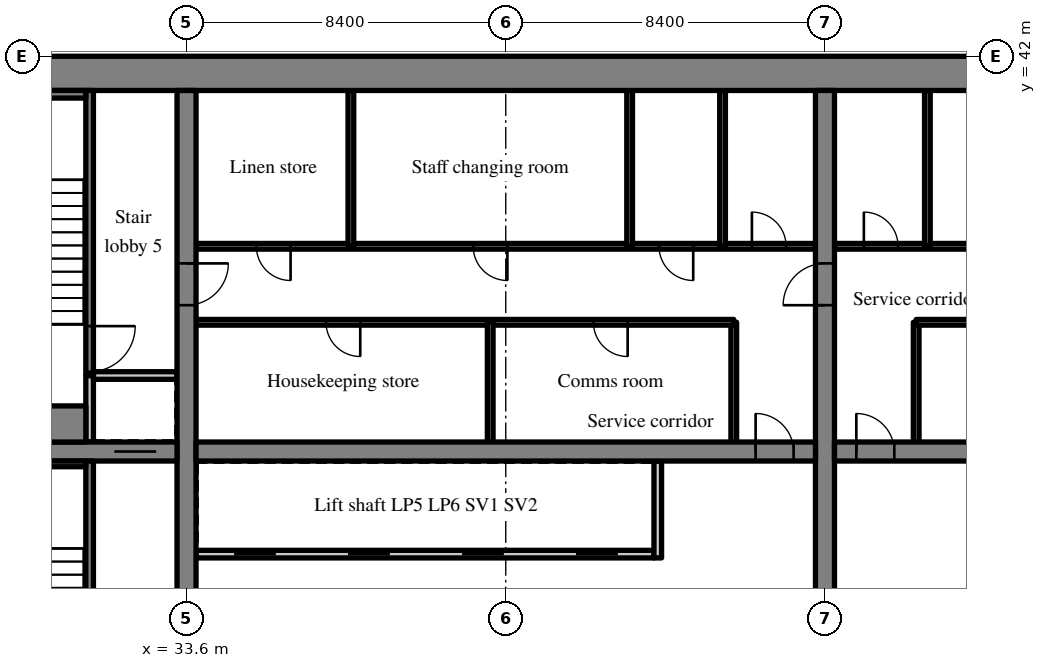
"""IFC4 building model, lengths in metres.
Left out: names, types, materials, properties, quantities, classifications, styles, units other than length and angle.
Written with IfcOpenShell. Run it as: python <this file> out.ifc"""

import sys

from ifc_helpers import new_model, si_unit, direction, frame, frame_2d, origin, place, context, subcontext, project, spatial, rectangle, extrude, source, transform, mapped, element, fill, save


model = new_model("IFC4")
c1 = context("Model", 3, precision=1e-05, world=origin(), true_north=direction((0.0, 1.0)))
c2 = subcontext(c1, "Body", "Model", "MODEL_VIEW")
j1 = project(units=[si_unit("LENGTHUNIT", "METRE"), si_unit("PLANEANGLEUNIT", "RADIAN")], contexts=[c1])
p1 = place(None, origin())
s1 = spatial("IfcSite", under=j1, at=p1, CompositionType="ELEMENT")
p2 = place(p1, origin())
s2 = spatial("IfcBuilding", under=s1, at=p2, CompositionType="ELEMENT")
p3 = place(p2, frame((0.0, 0.0, 106.6)))
s3 = spatial("IfcBuildingStorey", under=s2, at=p3, CompositionType="ELEMENT", Elevation=106.6)
m1 = source(origin(), c2, "Body", "SweptSolid", [
    extrude(rectangle(XDim=50.4, YDim=0.9, at=frame_2d((25.2, 0.0))), origin(), (0.0, 0.0, 1.0), 3.52),
])
p4 = place(p3, frame((25.2, 41.55, 0.0), z_axis=(0.0, 0.0, 1.0), x_axis=(1.0, 0.0, 0.0)))
e1 = element("IfcWall", 1, at=p4, inside=s3, PredefinedType="SHEAR", context=c2, shape_type="MappedRepresentation", body=[
    mapped(m1, transform((0.0, 0.0, 0.0), scale=1.0)),
])
m2 = source(origin(), c2, "Body", "SweptSolid", [
    extrude(rectangle(XDim=18.2, YDim=0.5, at=frame_2d((9.1, 0.0))), origin(), (0.0, 0.0, 1.0), 3.52),
])
p5 = place(p3, frame((33.6, 22.9, 0.0), z_axis=(0.0, 0.0, 1.0), x_axis=(0.0, 1.0, 0.0)))
e2 = element("IfcWall", 2, at=p5, inside=s3, PredefinedType="SHEAR", context=c2, shape_type="MappedRepresentation", body=[
    mapped(m2, transform((0.0, 0.0, 0.0), scale=1.0)),
])
m3 = source(origin(), c2, "Body", "SweptSolid", [
    extrude(rectangle(XDim=1.1, YDim=2.1, at=frame_2d((0.55, 1.05))), frame((0.0, 0.26, 0.0), z_axis=(0.0, -1.0, 0.0), x_axis=(1.0, 0.0, 0.0)), (0.0, 0.0, 1.0), 0.52),
])
p6 = place(p5, frame((12.55, 0.0, 0.0)))
e3 = element("IfcOpeningElement", 3, at=p6, cuts=e2, PredefinedType="OPENING", context=c2, shape_type="MappedRepresentation", body=[
    mapped(m3, transform((0.0, 0.0, 0.0), scale=1.0)),
])
p7 = place(p3, frame((50.4, 22.9, 0.0), z_axis=(0.0, 0.0, 1.0), x_axis=(0.0, 1.0, 0.0)))
e4 = element("IfcWall", 4, at=p7, inside=s3, PredefinedType="SHEAR", context=c2, shape_type="MappedRepresentation", body=[
    mapped(m2, transform((0.0, 0.0, 0.0), scale=1.0)),
])
p8 = place(p7, frame((12.55, 0.0, 0.0)))
e5 = element("IfcOpeningElement", 5, at=p8, cuts=e4, PredefinedType="OPENING", context=c2, shape_type="MappedRepresentation", body=[
    mapped(m3, transform((0.0, 0.0, 0.0), scale=1.0)),
])
m4 = source(origin(), c2, "Body", "SweptSolid", [
    extrude(rectangle(XDim=7.25, YDim=0.5, at=frame_2d((3.625, 0.0))), origin(), (0.0, 0.0, 1.0), 3.52),
])
p9 = place(p3, frame((26.1, 31.6, 0.0), z_axis=(0.0, 0.0, 1.0), x_axis=(1.0, 0.0, 0.0)))
e6 = element("IfcWall", 6, at=p9, inside=s3, PredefinedType="SHEAR", context=c2, shape_type="MappedRepresentation", body=[
    mapped(m4, transform((0.0, 0.0, 0.0), scale=1.0)),
])
p10 = place(p9, frame((5.6, 0.0, 0.0)))
e7 = element("IfcOpeningElement", 7, at=p10, cuts=e6, PredefinedType="OPENING", context=c2, shape_type="MappedRepresentation", body=[
    mapped(m3, transform((0.0, 0.0, 0.0), scale=1.0)),
])
m5 = source(origin(), c2, "Body", "SweptSolid", [
    extrude(rectangle(XDim=16.3, YDim=0.5, at=frame_2d((8.15, 0.0))), origin(), (0.0, 0.0, 1.0), 3.52),
])
p11 = place(p3, frame((33.85, 31.6, 0.0), z_axis=(0.0, 0.0, 1.0), x_axis=(1.0, 0.0, 0.0)))
e8 = element("IfcWall", 8, at=p11, inside=s3, PredefinedType="SHEAR", context=c2, shape_type="MappedRepresentation", body=[
    mapped(m5, transform((0.0, 0.0, 0.0), scale=1.0)),
])
m6 = source(origin(), c2, "Body", "SweptSolid", [
    extrude(rectangle(XDim=1.0, YDim=2.1, at=frame_2d((0.5, 1.05))), frame((0.0, 0.26, 0.0), z_axis=(0.0, -1.0, 0.0), x_axis=(1.0, 0.0, 0.0)), (0.0, 0.0, 1.0), 0.52),
])
p12 = place(p11, frame((14.725, 0.0, 0.0)))
e9 = element("IfcOpeningElement", 9, at=p12, cuts=e8, PredefinedType="OPENING", context=c2, shape_type="MappedRepresentation", body=[
    mapped(m6, transform((0.0, 0.0, 0.0), scale=1.0)),
])
m7 = source(origin(), c2, "Body", "SweptSolid", [
    extrude(rectangle(XDim=16.3, YDim=0.5, at=frame_2d((8.15, 0.0))), origin(), (0.0, 0.0, 1.0), 3.52),
])
p13 = place(p3, frame((50.65, 31.6, 0.0), z_axis=(0.0, 0.0, 1.0), x_axis=(1.0, 0.0, 0.0)))
e10 = element("IfcWall", 10, at=p13, inside=s3, PredefinedType="SHEAR", context=c2, shape_type="MappedRepresentation", body=[
    mapped(m7, transform((0.0, 0.0, 0.0), scale=1.0)),
])
p14 = place(p13, frame((0.575, 0.0, 0.0)))
e11 = element("IfcOpeningElement", 11, at=p14, cuts=e10, PredefinedType="OPENING", context=c2, shape_type="MappedRepresentation", body=[
    mapped(m6, transform((0.0, 0.0, 0.0), scale=1.0)),
])
m8 = source(origin(), c2, "Body", "SweptSolid", [
    extrude(rectangle(XDim=12.05, YDim=0.2, at=frame_2d((6.025, 0.0))), origin(), (0.0, 0.0, 1.0), 3.52),
])
p15 = place(p3, frame((33.85, 28.9, 0.0), z_axis=(0.0, 0.0, 1.0), x_axis=(1.0, 0.0, 0.0)))
e12 = element("IfcWall", 12, at=p15, inside=s3, PredefinedType="SOLIDWALL", context=c2, shape_type="MappedRepresentation", body=[
    mapped(m8, transform((0.0, 0.0, 0.0), scale=1.0)),
])
m9 = source(origin(), c2, "Body", "SweptSolid", [
    extrude(rectangle(XDim=1.1, YDim=2.1, at=frame_2d((0.55, 1.05))), frame((0.0, 0.11, 0.0), z_axis=(0.0, -1.0, 0.0), x_axis=(1.0, 0.0, 0.0)), (0.0, 0.0, 1.0), 0.22),
])
p16 = place(p15, frame((1.0, 0.0, 0.0)))
e13 = element("IfcOpeningElement", 13, at=p16, cuts=e12, PredefinedType="OPENING", context=c2, shape_type="MappedRepresentation", body=[
    mapped(m9, transform((0.0, 0.0, 0.0), scale=1.0)),
])
p17 = place(p15, frame((4.0, 0.0, 0.0)))
e14 = element("IfcOpeningElement", 14, at=p17, cuts=e12, PredefinedType="OPENING", context=c2, shape_type="MappedRepresentation", body=[
    mapped(m9, transform((0.0, 0.0, 0.0), scale=1.0)),
])
p18 = place(p15, frame((7.0, 0.0, 0.0)))
e15 = element("IfcOpeningElement", 15, at=p18, cuts=e12, PredefinedType="OPENING", context=c2, shape_type="MappedRepresentation", body=[
    mapped(m9, transform((0.0, 0.0, 0.0), scale=1.0)),
])
p19 = place(p15, frame((10.0, 0.0, 0.0)))
e16 = element("IfcOpeningElement", 16, at=p19, cuts=e12, PredefinedType="OPENING", context=c2, shape_type="MappedRepresentation", body=[
    mapped(m9, transform((0.0, 0.0, 0.0), scale=1.0)),
])
m10 = source(origin(), c2, "Body", "SweptSolid", [
    extrude(rectangle(XDim=2.55, YDim=0.2, at=frame_2d((1.275, 0.0))), origin(), (0.0, 0.0, 1.0), 3.52),
])
p20 = place(p3, frame((46.0, 28.8, 0.0), z_axis=(0.0, 0.0, 1.0), x_axis=(0.0, 1.0, 0.0)))
e17 = element("IfcWall", 17, at=p20, inside=s3, PredefinedType="SOLIDWALL", context=c2, shape_type="MappedRepresentation", body=[
    mapped(m10, transform((0.0, 0.0, 0.0), scale=1.0)),
])
m11 = source(origin(), c2, "Body", "SweptSolid", [
    extrude(rectangle(XDim=3.15, YDim=0.15, at=frame_2d((1.575, 0.0))), origin(), (0.0, 0.0, 1.0), 3.52),
])
p21 = place(p3, frame((48.0, 31.85, 0.0), z_axis=(0.0, 0.0, 1.0), x_axis=(0.0, 1.0, 0.0)))
e18 = element("IfcWall", 18, at=p21, inside=s3, PredefinedType="PARTITIONING", context=c2, shape_type="MappedRepresentation", body=[
    mapped(m11, transform((0.0, 0.0, 0.0), scale=1.0)),
])
m12 = source(origin(), c2, "Body", "SweptSolid", [
    extrude(rectangle(XDim=14.15, YDim=0.15, at=frame_2d((7.075, 0.0))), origin(), (0.0, 0.0, 1.0), 3.52),
])
p22 = place(p3, frame((33.85, 35.0, 0.0), z_axis=(0.0, 0.0, 1.0), x_axis=(1.0, 0.0, 0.0)))
e19 = element("IfcWall", 19, at=p22, inside=s3, PredefinedType="PARTITIONING", context=c2, shape_type="MappedRepresentation", body=[
    mapped(m12, transform((0.0, 0.0, 0.0), scale=1.0)),
])
m13 = source(origin(), c2, "Body", "SweptSolid", [
    extrude(rectangle(XDim=0.9, YDim=2.1, at=frame_2d((0.45, 1.05))), frame((0.0, 0.085, 0.0), z_axis=(0.0, -1.0, 0.0), x_axis=(1.0, 0.0, 0.0)), (0.0, 0.0, 1.0), 0.17),
])
p23 = place(p22, frame((3.421, 0.0, 0.0)))
e20 = element("IfcOpeningElement", 20, at=p23, cuts=e19, PredefinedType="OPENING", context=c2, shape_type="MappedRepresentation", body=[
    mapped(m13, transform((0.0, 0.0, 0.0), scale=1.0)),
])
p24 = place(p22, frame((10.458, 0.0, 0.0)))
e21 = element("IfcOpeningElement", 21, at=p24, cuts=e19, PredefinedType="OPENING", context=c2, shape_type="MappedRepresentation", body=[
    mapped(m13, transform((0.0, 0.0, 0.0), scale=1.0)),
])
m14 = source(origin(), c2, "Body", "SweptSolid", [
    extrude(rectangle(XDim=16.3, YDim=0.15, at=frame_2d((8.15, 0.0))), origin(), (0.0, 0.0, 1.0), 3.52),
])
p25 = place(p3, frame((33.85, 37.0, 0.0), z_axis=(0.0, 0.0, 1.0), x_axis=(1.0, 0.0, 0.0)))
e22 = element("IfcWall", 22, at=p25, inside=s3, PredefinedType="PARTITIONING", context=c2, shape_type="MappedRepresentation", body=[
    mapped(m14, transform((0.0, 0.0, 0.0), scale=1.0)),
])
p26 = place(p25, frame((1.588, 0.0, 0.0)))
e23 = element("IfcOpeningElement", 23, at=p26, cuts=e22, PredefinedType="OPENING", context=c2, shape_type="MappedRepresentation", body=[
    mapped(m13, transform((0.0, 0.0, 0.0), scale=1.0)),
])
p27 = place(p25, frame((7.293, 0.0, 0.0)))
e24 = element("IfcOpeningElement", 24, at=p27, cuts=e22, PredefinedType="OPENING", context=c2, shape_type="MappedRepresentation", body=[
    mapped(m13, transform((0.0, 0.0, 0.0), scale=1.0)),
])
p28 = place(p25, frame((12.183, 0.0, 0.0)))
e25 = element("IfcOpeningElement", 25, at=p28, cuts=e22, PredefinedType="OPENING", context=c2, shape_type="MappedRepresentation", body=[
    mapped(m13, transform((0.0, 0.0, 0.0), scale=1.0)),
])
p29 = place(p25, frame((14.627, 0.0, 0.0)))
e26 = element("IfcOpeningElement", 26, at=p29, cuts=e22, PredefinedType="OPENING", context=c2, shape_type="MappedRepresentation", body=[
    mapped(m13, transform((0.0, 0.0, 0.0), scale=1.0)),
])
p30 = place(p3, frame((41.591, 31.85, 0.0), z_axis=(0.0, 0.0, 1.0), x_axis=(0.0, 1.0, 0.0)))
e27 = element("IfcWall", 27, at=p30, inside=s3, PredefinedType="PARTITIONING", context=c2, shape_type="MappedRepresentation", body=[
    mapped(m11, transform((0.0, 0.0, 0.0), scale=1.0)),
])
m15 = source(origin(), c2, "Body", "SweptSolid", [
    extrude(rectangle(XDim=4.1, YDim=0.15, at=frame_2d((2.05, 0.0))), origin(), (0.0, 0.0, 1.0), 3.52),
])
for number, where, z_axis, x_axis in (
    (28, (37.925, 37.0, 0.0), (0.0, 0.0, 1.0), (0.0, 1.0, 0.0)),
    (29, (45.26, 37.0, 0.0), (0.0, 0.0, 1.0), (0.0, 1.0, 0.0)),
    (30, (47.705, 37.0, 0.0), (0.0, 0.0, 1.0), (0.0, 1.0, 0.0)),
):
    element("IfcWall", number, at=place(p3, frame(where, z_axis=z_axis, x_axis=x_axis)), inside=s3, PredefinedType="PARTITIONING", context=c2, shape_type="MappedRepresentation", body=[
        mapped(m15, transform((0.0, 0.0, 0.0), scale=1.0)),
    ])
p31 = place(p3, frame((52.8, 31.85, 0.0), z_axis=(0.0, 0.0, 1.0), x_axis=(0.0, 1.0, 0.0)))
e31 = element("IfcWall", 31, at=p31, inside=s3, PredefinedType="PARTITIONING", context=c2, shape_type="MappedRepresentation", body=[
    mapped(m11, transform((0.0, 0.0, 0.0), scale=1.0)),
])
p32 = place(p3, frame((66.95, 35.0, 0.0), z_axis=(0.0, 0.0, 1.0), x_axis=(-1.0, 0.0, 0.0)))
e32 = element("IfcWall", 32, at=p32, inside=s3, PredefinedType="PARTITIONING", context=c2, shape_type="MappedRepresentation", body=[
    mapped(m12, transform((0.0, 0.0, 0.0), scale=1.0)),
])
p33 = place(p32, frame((6.588, 0.0, 0.0)))
e33 = element("IfcOpeningElement", 33, at=p33, cuts=e32, PredefinedType="OPENING", context=c2, shape_type="MappedRepresentation", body=[
    mapped(m13, transform((0.0, 0.0, 0.0), scale=1.0)),
])
m16 = source(origin(), c2, "Body", "SweptSolid", [
    extrude(rectangle(XDim=16.3, YDim=0.15, at=frame_2d((8.15, 0.0))), origin(), (0.0, 0.0, 1.0), 3.52),
])
p34 = place(p3, frame((66.95, 37.0, 0.0), z_axis=(0.0, 0.0, 1.0), x_axis=(-1.0, 0.0, 0.0)))
e34 = element("IfcWall", 34, at=p34, inside=s3, PredefinedType="PARTITIONING", context=c2, shape_type="MappedRepresentation", body=[
    mapped(m16, transform((0.0, 0.0, 0.0), scale=1.0)),
])
p35 = place(p34, frame((3.218, 0.0, 0.0)))
e35 = element("IfcOpeningElement", 35, at=p35, cuts=e34, PredefinedType="OPENING", context=c2, shape_type="MappedRepresentation", body=[
    mapped(m13, transform((0.0, 0.0, 0.0), scale=1.0)),
])
p36 = place(p34, frame((8.108, 0.0, 0.0)))
e36 = element("IfcOpeningElement", 36, at=p36, cuts=e34, PredefinedType="OPENING", context=c2, shape_type="MappedRepresentation", body=[
    mapped(m13, transform((0.0, 0.0, 0.0), scale=1.0)),
])
p37 = place(p34, frame((11.368, 0.0, 0.0)))
e37 = element("IfcOpeningElement", 37, at=p37, cuts=e34, PredefinedType="OPENING", context=c2, shape_type="MappedRepresentation", body=[
    mapped(m13, transform((0.0, 0.0, 0.0), scale=1.0)),
])
p38 = place(p34, frame((14.627, 0.0, 0.0)))
e38 = element("IfcOpeningElement", 38, at=p38, cuts=e34, PredefinedType="OPENING", context=c2, shape_type="MappedRepresentation", body=[
    mapped(m13, transform((0.0, 0.0, 0.0), scale=1.0)),
])
p39 = place(p3, frame((53.095, 37.0, 0.0), z_axis=(0.0, 0.0, 1.0), x_axis=(0.0, 1.0, 0.0)))
e39 = element("IfcWall", 39, at=p39, inside=s3, PredefinedType="PARTITIONING", context=c2, shape_type="MappedRepresentation", body=[
    mapped(m15, transform((0.0, 0.0, 0.0), scale=1.0)),
])
m17 = source(origin(), c2, "Body", "SweptSolid", [
    extrude(rectangle(XDim=8.45, YDim=0.2, at=frame_2d((4.225, 0.0))), origin(), (0.0, 0.0, 1.0), 3.52),
])
p40 = place(p3, frame((31.05, 22.9, 0.0), z_axis=(0.0, 0.0, 1.0), x_axis=(0.0, 1.0, 0.0)))
e40 = element("IfcWall", 40, at=p40, inside=s3, PredefinedType="SOLIDWALL", context=c2, shape_type="MappedRepresentation", body=[
    mapped(m17, transform((0.0, 0.0, 0.0), scale=1.0)),
])
m18 = source(origin(), c2, "Body", "SweptSolid", [
    extrude(rectangle(XDim=1.2, YDim=2.1, at=frame_2d((0.6, 1.05))), frame((0.0, 0.11, 0.0), z_axis=(0.0, -1.0, 0.0), x_axis=(1.0, 0.0, 0.0)), (0.0, 0.0, 1.0), 0.22),
])
p41 = place(p40, frame((0.7, 0.0, 0.0)))
e41 = element("IfcOpeningElement", 41, at=p41, cuts=e40, PredefinedType="OPENING", context=c2, shape_type="MappedRepresentation", body=[
    mapped(m18, transform((0.0, 0.0, 0.0), scale=1.0)),
])
m19 = source(origin(), c2, "Body", "SweptSolid", [
    extrude(rectangle(XDim=1.75, YDim=0.2, at=frame_2d((0.875, 0.0))), origin(), (0.0, 0.0, 1.0), 3.52),
])
p42 = place(p3, frame((31.05, 31.85, 0.0), z_axis=(0.0, 0.0, 1.0), x_axis=(0.0, 1.0, 0.0)))
e42 = element("IfcWall", 42, at=p42, inside=s3, PredefinedType="SOLIDWALL", context=c2, shape_type="MappedRepresentation", body=[
    mapped(m19, transform((0.0, 0.0, 0.0), scale=1.0)),
])
m20 = source(origin(), c2, "Body", "SweptSolid", [
    extrude(rectangle(XDim=2.2, YDim=0.2, at=frame_2d((1.1, 0.0))), origin(), (0.0, 0.0, 1.0), 3.52),
])
p43 = place(p3, frame((31.15, 33.6, 0.0), z_axis=(0.0, 0.0, 1.0), x_axis=(1.0, 0.0, 0.0)))
e43 = element("IfcWall", 43, at=p43, inside=s3, PredefinedType="SOLIDWALL", context=c2, shape_type="MappedRepresentation", body=[
    mapped(m20, transform((0.0, 0.0, 0.0), scale=1.0)),
])
m21 = source(origin(), c2, "Body", "SweptSolid", [
    extrude(rectangle(XDim=7.5, YDim=0.2, at=frame_2d((3.75, 0.0))), origin(), (0.0, 0.0, 1.0), 3.52),
])
p44 = place(p3, frame((31.05, 33.6, 0.0), z_axis=(0.0, 0.0, 1.0), x_axis=(0.0, 1.0, 0.0)))
e44 = element("IfcWall", 44, at=p44, inside=s3, PredefinedType="SOLIDWALL", context=c2, shape_type="MappedRepresentation", body=[
    mapped(m21, transform((0.0, 0.0, 0.0), scale=1.0)),
])
p45 = place(p44, frame((0.1, 0.0, 0.0)))
e45 = element("IfcOpeningElement", 45, at=p45, cuts=e44, PredefinedType="OPENING", context=c2, shape_type="MappedRepresentation", body=[
    mapped(m18, transform((0.0, 0.0, 0.0), scale=1.0)),
])
m22 = source(origin(), c2, "Body", "SweptSolid", [
    extrude(rectangle(XDim=4.85, YDim=0.15, at=frame_2d((2.425, 0.0))), origin(), (0.0, 0.0, 1.0), 3.52),
])
p46 = place(p3, frame((26.1, 31.275, 0.0), z_axis=(0.0, 0.0, 1.0), x_axis=(1.0, 0.0, 0.0)))
e46 = element("IfcWall", 46, at=p46, inside=s3, PredefinedType="SOLIDWALL", context=c2, shape_type="MappedRepresentation", body=[
    mapped(m22, transform((0.0, 0.0, 0.0), scale=1.0)),
])
m23 = source(origin(), c2, "Body", "SweptSolid", [
    extrude(rectangle(XDim=4.85, YDim=0.2, at=frame_2d((2.425, 0.0))), origin(), (0.0, 0.0, 1.0), 3.52),
])
p47 = place(p3, frame((26.1, 41.0, 0.0), z_axis=(0.0, 0.0, 1.0), x_axis=(1.0, 0.0, 0.0)))
e47 = element("IfcWall", 47, at=p47, inside=s3, PredefinedType="SOLIDWALL", context=c2, shape_type="MappedRepresentation", body=[
    mapped(m23, transform((0.0, 0.0, 0.0), scale=1.0)),
])
m24 = source(origin(), c2, "Body", "SweptSolid", [
    extrude(rectangle(XDim=4.85, YDim=0.95, at=frame_2d((2.425, 0.0))), origin(), (0.0, 0.0, 1.0), 3.52),
])
p48 = place(p3, frame((26.1, 32.325, 0.0), z_axis=(0.0, 0.0, 1.0), x_axis=(1.0, 0.0, 0.0)))
e48 = element("IfcWall", 48, at=p48, inside=s3, PredefinedType="SOLIDWALL", context=c2, shape_type="MappedRepresentation", body=[
    mapped(m24, transform((0.0, 0.0, 0.0), scale=1.0)),
])
m25 = source(origin(), c2, "Body", "SweptSolid", [
    extrude(rectangle(XDim=1.0, YDim=2.1, at=frame_2d((0.5, 1.05))), frame((0.0, 0.025, 0.0), z_axis=(0.0, -1.0, 0.0), x_axis=(1.0, 0.0, 0.0)), (0.0, 0.0, 1.0), 0.05),
])
p49 = place(p12, origin())
e49 = element("IfcDoor", 49, at=p49, inside=s3, OperationType="SINGLE_SWING_LEFT", PredefinedType="DOOR", context=c2, shape_type="MappedRepresentation", body=[
    mapped(m25, transform((0.0, 0.0, 0.0), scale=1.0)),
])
fill(e9, e49)
m26 = source(origin(), c2, "Body", "SweptSolid", [
    extrude(rectangle(XDim=1.1, YDim=2.1, at=frame_2d((0.55, 1.05))), frame((0.0, 0.025, 0.0), z_axis=(0.0, -1.0, 0.0), x_axis=(1.0, 0.0, 0.0)), (0.0, 0.0, 1.0), 0.05),
])
p50 = place(p16, origin())
e50 = element("IfcDoor", 50, at=p50, inside=s3, OperationType="SLIDING_TO_LEFT", PredefinedType="DOOR", context=c2, shape_type="MappedRepresentation", body=[
    mapped(m26, transform((0.0, 0.0, 0.0), scale=1.0)),
])
fill(e13, e50)
p51 = place(p17, origin())
e51 = element("IfcDoor", 51, at=p51, inside=s3, OperationType="SLIDING_TO_RIGHT", PredefinedType="DOOR", context=c2, shape_type="MappedRepresentation", body=[
    mapped(m26, transform((0.0, 0.0, 0.0), scale=1.0)),
])
fill(e14, e51)
p52 = place(p18, origin())
e52 = element("IfcDoor", 52, at=p52, inside=s3, OperationType="SLIDING_TO_LEFT", PredefinedType="DOOR", context=c2, shape_type="MappedRepresentation", body=[
    mapped(m26, transform((0.0, 0.0, 0.0), scale=1.0)),
])
fill(e15, e52)
p53 = place(p19, origin())
e53 = element("IfcDoor", 53, at=p53, inside=s3, OperationType="SLIDING_TO_RIGHT", PredefinedType="DOOR", context=c2, shape_type="MappedRepresentation", body=[
    mapped(m26, transform((0.0, 0.0, 0.0), scale=1.0)),
])
fill(e16, e53)
m27 = source(origin(), c2, "Body", "SweptSolid", [
    extrude(rectangle(XDim=0.9, YDim=2.1, at=frame_2d((0.45, 1.05))), frame((0.0, 0.025, 0.0), z_axis=(0.0, -1.0, 0.0), x_axis=(1.0, 0.0, 0.0)), (0.0, 0.0, 1.0), 0.05),
])
p54 = place(p23, origin())
e54 = element("IfcDoor", 54, at=p54, inside=s3, OperationType="SINGLE_SWING_RIGHT", PredefinedType="DOOR", context=c2, shape_type="MappedRepresentation", body=[
    mapped(m27, transform((0.0, 0.0, 0.0), scale=1.0)),
])
fill(e20, e54)
p55 = place(p24, origin())
e55 = element("IfcDoor", 55, at=p55, inside=s3, OperationType="SINGLE_SWING_RIGHT", PredefinedType="DOOR", context=c2, shape_type="MappedRepresentation", body=[
    mapped(m27, transform((0.0, 0.0, 0.0), scale=1.0)),
])
fill(e21, e55)
p56 = place(p26, origin())
e56 = element("IfcDoor", 56, at=p56, inside=s3, OperationType="SINGLE_SWING_RIGHT", PredefinedType="DOOR", context=c2, shape_type="MappedRepresentation", body=[
    mapped(m27, transform((0.0, 0.0, 0.0), scale=1.0)),
])
fill(e23, e56)
p57 = place(p27, origin())
e57 = element("IfcDoor", 57, at=p57, inside=s3, OperationType="SINGLE_SWING_RIGHT", PredefinedType="DOOR", context=c2, shape_type="MappedRepresentation", body=[
    mapped(m27, transform((0.0, 0.0, 0.0), scale=1.0)),
])
fill(e24, e57)
p58 = place(p28, origin())
e58 = element("IfcDoor", 58, at=p58, inside=s3, OperationType="SINGLE_SWING_RIGHT", PredefinedType="DOOR", context=c2, shape_type="MappedRepresentation", body=[
    mapped(m27, transform((0.0, 0.0, 0.0), scale=1.0)),
])
fill(e25, e58)
p59 = place(p29, origin())
e59 = element("IfcDoor", 59, at=p59, inside=s3, OperationType="SINGLE_SWING_LEFT", PredefinedType="DOOR", context=c2, shape_type="MappedRepresentation", body=[
    mapped(m27, transform((0.0, 0.0, 0.0), scale=1.0)),
])
fill(e26, e59)
p60 = place(p14, origin())
e60 = element("IfcDoor", 60, at=p60, inside=s3, OperationType="SINGLE_SWING_LEFT", PredefinedType="DOOR", context=c2, shape_type="MappedRepresentation", body=[
    mapped(m25, transform((0.0, 0.0, 0.0), scale=1.0)),
])
fill(e11, e60)
p61 = place(p38, origin())
e61 = element("IfcDoor", 61, at=p61, inside=s3, OperationType="SINGLE_SWING_RIGHT", PredefinedType="DOOR", context=c2, shape_type="MappedRepresentation", body=[
    mapped(m27, transform((0.0, 0.0, 0.0), scale=1.0)),
])
fill(e38, e61)
p62 = place(p10, origin())
e62 = element("IfcDoor", 62, at=p62, inside=s3, OperationType="SLIDING_TO_RIGHT", PredefinedType="DOOR", context=c2, shape_type="MappedRepresentation", body=[
    mapped(m26, transform((0.0, 0.0, 0.0), scale=1.0)),
])
fill(e7, e62)
m28 = source(origin(), c2, "Body", "SweptSolid", [
    extrude(rectangle(XDim=1.2, YDim=2.1, at=frame_2d((0.6, 1.05))), frame((0.0, 0.025, 0.0), z_axis=(0.0, -1.0, 0.0), x_axis=(1.0, 0.0, 0.0)), (0.0, 0.0, 1.0), 0.05),
])
p63 = place(p45, origin())
e63 = element("IfcDoor", 63, at=p63, inside=s3, OperationType="SINGLE_SWING_RIGHT", PredefinedType="DOOR", context=c2, shape_type="MappedRepresentation", body=[
    mapped(m28, transform((0.0, 0.0, 0.0), scale=1.0)),
])
fill(e45, e63)
p64 = place(p6, origin())
e64 = element("IfcDoor", 64, at=p64, inside=s3, OperationType="SINGLE_SWING_RIGHT", PredefinedType="DOOR", context=c2, shape_type="MappedRepresentation", body=[
    mapped(m26, transform((0.0, 0.0, 0.0), scale=1.0)),
])
fill(e3, e64)
p65 = place(p8, origin())
e65 = element("IfcDoor", 65, at=p65, inside=s3, OperationType="SINGLE_SWING_LEFT", PredefinedType="DOOR", context=c2, shape_type="MappedRepresentation", body=[
    mapped(m26, transform((0.0, 0.0, 0.0), scale=1.0)),
])
fill(e5, e65)
save(model, sys.argv[1])
